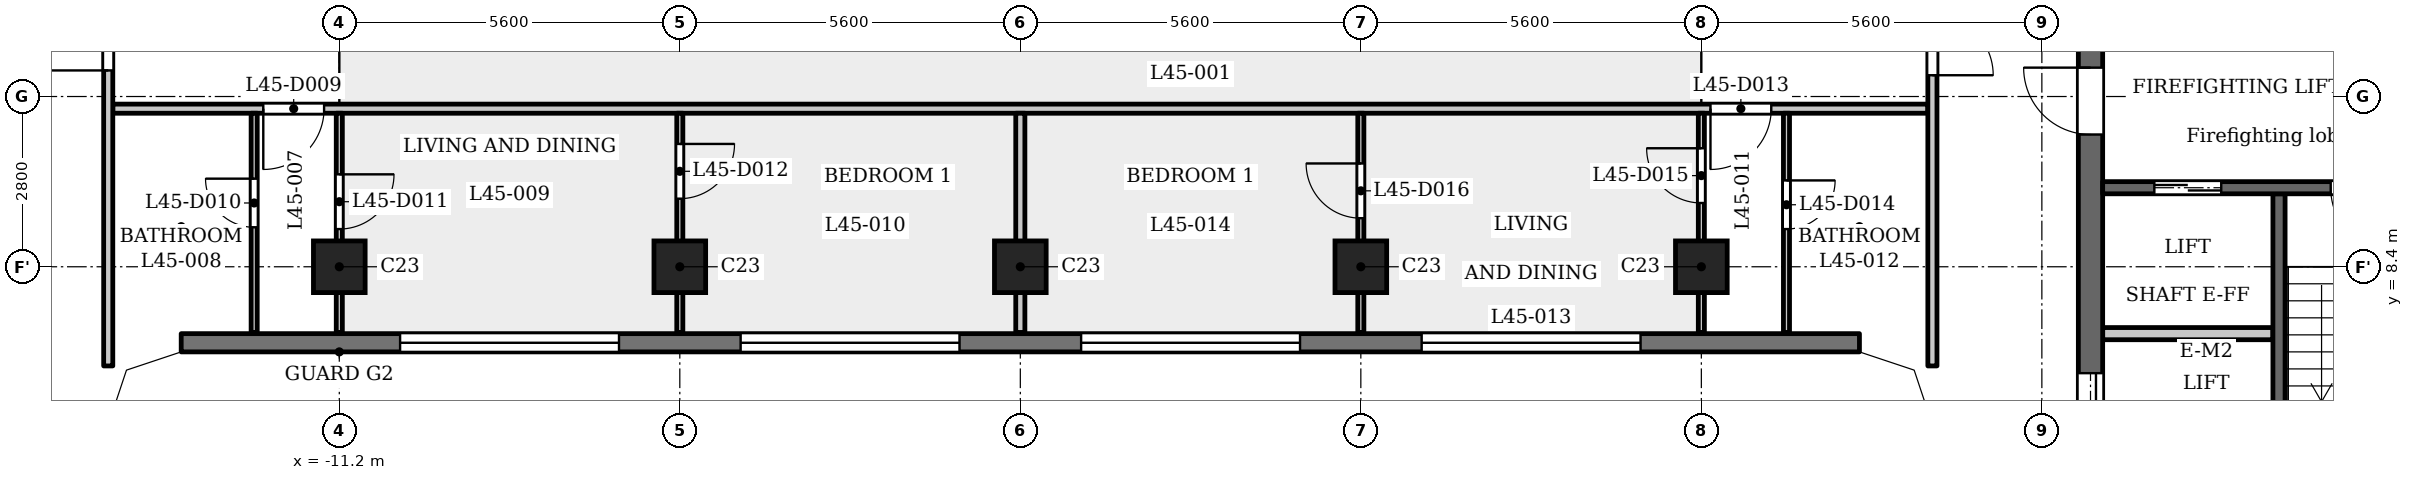
"""IFC4 building model, lengths in metres.
Left out: names, types, materials, properties, quantities, classifications, styles, units other than length and angle.
Written with IfcOpenShell. Run it as: python <this file> out.ifc"""

import sys

from ifc_helpers import new_model, si_unit, direction, frame, frame_2d, origin, origin_2d, place, context, subcontext, project, spatial, polyline, rectangle, outline, extrude, element, fill, save


model = new_model("IFC4")
c1 = context("Model", 3, precision=1e-05, world=origin(), true_north=direction((0.0, 1.0)))
c2 = subcontext(c1, "Body", "Model", "MODEL_VIEW")
j1 = project(units=[si_unit("LENGTHUNIT", "METRE"), si_unit("PLANEANGLEUNIT", "RADIAN")], contexts=[c1])
p1 = place(None, origin())
s1 = spatial("IfcSite", under=j1, at=p1, CompositionType="ELEMENT")
p2 = place(p1, origin())
s2 = spatial("IfcBuilding", under=s1, at=p2, CompositionType="ELEMENT")
p3 = place(p2, frame((0.0, 0.0, 174.6)))
s3 = spatial("IfcBuildingStorey", under=s2, at=p3, CompositionType="ELEMENT", Elevation=174.6)
for number, where, z_axis, x_axis in (
    (1, (-11.2, 8.4, 0.0), (0.0, 0.0, 1.0), (1.0, 0.0, 0.0)),
    (2, (-5.6, 8.4, 0.0), (0.0, 0.0, 1.0), (1.0, 0.0, 0.0)),
    (3, (0.0, 8.4, 0.0), (0.0, 0.0, 1.0), (1.0, 0.0, 0.0)),
    (4, (5.6, 8.4, 0.0), (0.0, 0.0, 1.0), (1.0, 0.0, 0.0)),
    (5, (11.2, 8.4, 0.0), (0.0, 0.0, 1.0), (1.0, 0.0, 0.0)),
):
    element("IfcColumn", number, at=place(p3, frame(where, z_axis=z_axis, x_axis=x_axis)), inside=s3, PredefinedType="COLUMN", context=c2, shape_type="SweptSolid", body=[
        extrude(rectangle(XDim=0.85, YDim=0.85, at=origin_2d()), origin(), (0.0, 0.0, 1.0), 3.5),
    ])
p4 = place(p3, frame((-13.8, 7.15, 0.0), z_axis=(0.0, 0.0, 1.0), x_axis=(1.0, 0.0, 0.0)))
e6 = element("IfcWall", 6, at=p4, inside=s3, PredefinedType="SOLIDWALL", context=c2, shape_type="SweptSolid", body=[
    extrude(rectangle(XDim=27.6, YDim=0.3, at=frame_2d((13.8, 0.0))), origin(), (0.0, 0.0, 1.0), 3.15),
])
p5 = place(p4, frame((3.6, 0.0, 1.2)))
e7 = element("IfcOpeningElement", 7, at=p5, cuts=e6, PredefinedType="OPENING", context=c2, shape_type="SweptSolid", body=[
    extrude(rectangle(XDim=3.6, YDim=0.95, at=frame_2d((1.8, 0.475))), frame((0.0, 0.16, 0.0), z_axis=(0.0, -1.0, 0.0), x_axis=(1.0, 0.0, 0.0)), (0.0, 0.0, 1.0), 0.32),
])
p6 = place(p4, frame((9.2, 0.0, 1.2)))
e8 = element("IfcOpeningElement", 8, at=p6, cuts=e6, PredefinedType="OPENING", context=c2, shape_type="SweptSolid", body=[
    extrude(rectangle(XDim=3.6, YDim=0.95, at=frame_2d((1.8, 0.475))), frame((0.0, 0.16, 0.0), z_axis=(0.0, -1.0, 0.0), x_axis=(1.0, 0.0, 0.0)), (0.0, 0.0, 1.0), 0.32),
])
p7 = place(p4, frame((14.8, 0.0, 1.2)))
e9 = element("IfcOpeningElement", 9, at=p7, cuts=e6, PredefinedType="OPENING", context=c2, shape_type="SweptSolid", body=[
    extrude(rectangle(XDim=3.6, YDim=0.95, at=frame_2d((1.8, 0.475))), frame((0.0, 0.16, 0.0), z_axis=(0.0, -1.0, 0.0), x_axis=(1.0, 0.0, 0.0)), (0.0, 0.0, 1.0), 0.32),
])
p8 = place(p4, frame((20.4, 0.0, 1.2)))
e10 = element("IfcOpeningElement", 10, at=p8, cuts=e6, PredefinedType="OPENING", context=c2, shape_type="SweptSolid", body=[
    extrude(rectangle(XDim=3.6, YDim=0.95, at=frame_2d((1.8, 0.475))), frame((0.0, 0.16, 0.0), z_axis=(0.0, -1.0, 0.0), x_axis=(1.0, 0.0, 0.0)), (0.0, 0.0, 1.0), 0.32),
])
p9 = place(p3, frame((20.7, 2.6, 0.0), z_axis=(0.0, 0.0, 1.0), x_axis=(0.0, 1.0, 0.0)))
e11 = element("IfcWall", 11, at=p9, inside=s3, PredefinedType="SHEAR", context=c2, shape_type="SweptSolid", body=[
    extrude(rectangle(XDim=7.0, YDim=0.2, at=frame_2d((3.5, 0.0))), origin(), (0.0, 0.0, 1.0), 3.15),
])
p10 = place(p3, frame((17.6, -12.45, 0.0), z_axis=(0.0, 0.0, 1.0), x_axis=(0.0, 1.0, 0.0)))
e12 = element("IfcWall", 12, at=p10, inside=s3, PredefinedType="SHEAR", context=c2, shape_type="SweptSolid", body=[
    extrude(rectangle(XDim=24.9, YDim=0.4, at=frame_2d((12.45, 0.0))), origin(), (0.0, 0.0, 1.0), 3.15),
])
p11 = place(p10, frame((8.65, 0.0, 0.0)))
e13 = element("IfcOpeningElement", 13, at=p11, cuts=e12, PredefinedType="OPENING", context=c2, shape_type="SweptSolid", body=[
    extrude(rectangle(XDim=0.9, YDim=2.1, at=frame_2d((0.45, 1.05))), frame((0.0, 0.21, 0.0), z_axis=(0.0, -1.0, 0.0), x_axis=(1.0, 0.0, 0.0)), (0.0, 0.0, 1.0), 0.42),
])
p12 = place(p10, frame((15.6, 0.0, 0.0)))
e14 = element("IfcOpeningElement", 14, at=p12, cuts=e12, PredefinedType="OPENING", context=c2, shape_type="SweptSolid", body=[
    extrude(rectangle(XDim=1.1, YDim=2.1, at=frame_2d((0.55, 1.05))), frame((0.0, 0.21, 0.0), z_axis=(0.0, -1.0, 0.0), x_axis=(1.0, 0.0, 0.0)), (0.0, 0.0, 1.0), 0.42),
])
p13 = place(p10, frame((18.0, 0.0, 0.0)))
e15 = element("IfcOpeningElement", 15, at=p13, cuts=e12, PredefinedType="OPENING", context=c2, shape_type="SweptSolid", body=[
    extrude(rectangle(XDim=1.1, YDim=2.1, at=frame_2d((0.55, 1.05))), frame((0.0, 0.21, 0.0), z_axis=(0.0, -1.0, 0.0), x_axis=(1.0, 0.0, 0.0)), (0.0, 0.0, 1.0), 0.42),
])
p14 = place(p10, frame((23.025, 0.0, 0.0)))
e16 = element("IfcOpeningElement", 16, at=p14, cuts=e12, PredefinedType="OPENING", context=c2, shape_type="SweptSolid", body=[
    extrude(rectangle(XDim=1.1, YDim=2.1, at=frame_2d((0.55, 1.05))), frame((0.0, 0.21, 0.0), z_axis=(0.0, -1.0, 0.0), x_axis=(1.0, 0.0, 0.0)), (0.0, 0.0, 1.0), 0.42),
])
p15 = place(p10, frame((0.775, 0.0, 0.0)))
e17 = element("IfcOpeningElement", 17, at=p15, cuts=e12, PredefinedType="OPENING", context=c2, shape_type="SweptSolid", body=[
    extrude(rectangle(XDim=1.1, YDim=2.1, at=frame_2d((0.55, 1.05))), frame((0.0, 0.21, 0.0), z_axis=(0.0, -1.0, 0.0), x_axis=(1.0, 0.0, 0.0)), (0.0, 0.0, 1.0), 0.42),
])
p16 = place(p10, frame((12.925, 0.0, 0.0)))
e18 = element("IfcOpeningElement", 18, at=p16, cuts=e12, PredefinedType="OPENING", context=c2, shape_type="SweptSolid", body=[
    extrude(rectangle(XDim=1.8, YDim=2.1, at=frame_2d((0.9, 1.05))), frame((0.0, 0.21, 0.0), z_axis=(0.0, -1.0, 0.0), x_axis=(1.0, 0.0, 0.0)), (0.0, 0.0, 1.0), 0.42),
])
p17 = place(p3, frame((17.8, 7.3, 0.0), z_axis=(0.0, 0.0, 1.0), x_axis=(1.0, 0.0, 0.0)))
e19 = element("IfcWall", 19, at=p17, inside=s3, PredefinedType="PARTITIONING", context=c2, shape_type="SweptSolid", body=[
    extrude(rectangle(XDim=2.8, YDim=0.2, at=frame_2d((1.4, 0.0))), origin(), (0.0, 0.0, 1.0), 3.15),
])
p18 = place(p3, frame((17.8, 9.7, 0.0), z_axis=(0.0, 0.0, 1.0), x_axis=(1.0, 0.0, 0.0)))
e20 = element("IfcWall", 20, at=p18, inside=s3, PredefinedType="SHEAR", context=c2, shape_type="SweptSolid", body=[
    extrude(rectangle(XDim=8.45, YDim=0.2, at=frame_2d((4.225, 0.0))), origin(), (0.0, 0.0, 1.0), 3.15),
])
p19 = place(p18, frame((0.85, 0.0, 0.0)))
e21 = element("IfcOpeningElement", 21, at=p19, cuts=e20, PredefinedType="OPENING", context=c2, shape_type="SweptSolid", body=[
    extrude(rectangle(XDim=1.1, YDim=2.1, at=frame_2d((0.55, 1.05))), frame((0.0, 0.11, 0.0), z_axis=(0.0, -1.0, 0.0), x_axis=(1.0, 0.0, 0.0)), (0.0, 0.0, 1.0), 0.22),
])
p20 = place(p18, frame((3.75, 0.0, 0.0)))
e22 = element("IfcOpeningElement", 22, at=p20, cuts=e20, PredefinedType="OPENING", context=c2, shape_type="SweptSolid", body=[
    extrude(rectangle(XDim=1.1, YDim=2.1, at=frame_2d((0.55, 1.05))), frame((0.0, 0.11, 0.0), z_axis=(0.0, -1.0, 0.0), x_axis=(1.0, 0.0, 0.0)), (0.0, 0.0, 1.0), 0.22),
])
p21 = place(p3, frame((-14.925, 11.0, 0.0), z_axis=(0.0, 0.0, 1.0), x_axis=(1.0, 0.0, 0.0)))
e23 = element("IfcWall", 23, at=p21, inside=s3, PredefinedType="PARTITIONING", context=c2, shape_type="SweptSolid", body=[
    extrude(rectangle(XDim=29.85, YDim=0.15, at=frame_2d((14.925, 0.0))), origin(), (0.0, 0.0, 1.0), 3.15),
])
p22 = place(p21, frame((2.475, 0.0, 0.0)))
e24 = element("IfcOpeningElement", 24, at=p22, cuts=e23, PredefinedType="OPENING", context=c2, shape_type="SweptSolid", body=[
    extrude(rectangle(XDim=1.0, YDim=2.1, at=frame_2d((0.5, 1.05))), frame((0.0, 0.085, 0.0), z_axis=(0.0, -1.0, 0.0), x_axis=(1.0, 0.0, 0.0)), (0.0, 0.0, 1.0), 0.17),
])
p23 = place(p21, frame((26.275, 0.0, 0.0)))
e25 = element("IfcOpeningElement", 25, at=p23, cuts=e23, PredefinedType="OPENING", context=c2, shape_type="SweptSolid", body=[
    extrude(rectangle(XDim=1.0, YDim=2.1, at=frame_2d((0.5, 1.05))), frame((0.0, 0.085, 0.0), z_axis=(0.0, -1.0, 0.0), x_axis=(1.0, 0.0, 0.0)), (0.0, 0.0, 1.0), 0.17),
])
p24 = place(p3, frame((-15.0, 6.769, 0.0), z_axis=(0.0, 0.0, 1.0), x_axis=(0.0, 1.0, 0.0)))
e26 = element("IfcWall", 26, at=p24, inside=s3, PredefinedType="PARTITIONING", context=c2, shape_type="SweptSolid", body=[
    extrude(rectangle(XDim=6.356, YDim=0.15, at=frame_2d((3.178, 0.0))), origin(), (0.0, 0.0, 1.0), 3.15),
])
p25 = place(p24, frame((4.86, 0.0, 0.0)))
e27 = element("IfcOpeningElement", 27, at=p25, cuts=e26, PredefinedType="OPENING", context=c2, shape_type="SweptSolid", body=[
    extrude(rectangle(XDim=1.0, YDim=2.1, at=frame_2d((0.5, 1.05))), frame((0.0, 0.085, 0.0), z_axis=(0.0, -1.0, 0.0), x_axis=(1.0, 0.0, 0.0)), (0.0, 0.0, 1.0), 0.17),
])
p26 = place(p3, frame((-12.6, 7.32, 0.0), z_axis=(0.0, 0.0, 1.0), x_axis=(0.0, 1.0, 0.0)))
e28 = element("IfcWall", 28, at=p26, inside=s3, PredefinedType="PARTITIONING", context=c2, shape_type="SweptSolid", body=[
    extrude(rectangle(XDim=3.605, YDim=0.1, at=frame_2d((1.802, 0.0))), origin(), (0.0, 0.0, 1.0), 3.15),
])
p27 = place(p26, frame((1.729, 0.0, 0.0)))
e29 = element("IfcOpeningElement", 29, at=p27, cuts=e28, PredefinedType="OPENING", context=c2, shape_type="SweptSolid", body=[
    extrude(rectangle(XDim=0.8, YDim=2.1, at=frame_2d((0.4, 1.05))), frame((0.0, 0.06, 0.0), z_axis=(0.0, -1.0, 0.0), x_axis=(1.0, 0.0, 0.0)), (0.0, 0.0, 1.0), 0.12),
])
p28 = place(p3, frame((-11.2, 7.32, 0.0), z_axis=(0.0, 0.0, 1.0), x_axis=(0.0, 1.0, 0.0)))
e30 = element("IfcWall", 30, at=p28, inside=s3, PredefinedType="PARTITIONING", context=c2, shape_type="SweptSolid", body=[
    extrude(rectangle(XDim=3.605, YDim=0.1, at=frame_2d((1.802, 0.0))), origin(), (0.0, 0.0, 1.0), 3.15),
])
p29 = place(p28, frame((1.7, 0.0, 0.0)))
e31 = element("IfcOpeningElement", 31, at=p29, cuts=e30, PredefinedType="OPENING", context=c2, shape_type="SweptSolid", body=[
    extrude(rectangle(XDim=0.9, YDim=2.1, at=frame_2d((0.45, 1.05))), frame((0.0, 0.06, 0.0), z_axis=(0.0, -1.0, 0.0), x_axis=(1.0, 0.0, 0.0)), (0.0, 0.0, 1.0), 0.12),
])
p30 = place(p3, frame((-5.6, 7.32, 0.0), z_axis=(0.0, 0.0, 1.0), x_axis=(0.0, 1.0, 0.0)))
e32 = element("IfcWall", 32, at=p30, inside=s3, PredefinedType="PARTITIONING", context=c2, shape_type="SweptSolid", body=[
    extrude(rectangle(XDim=3.605, YDim=0.1, at=frame_2d((1.802, 0.0))), origin(), (0.0, 0.0, 1.0), 3.15),
])
p31 = place(p30, frame((2.2, 0.0, 0.0)))
e33 = element("IfcOpeningElement", 33, at=p31, cuts=e32, PredefinedType="OPENING", context=c2, shape_type="SweptSolid", body=[
    extrude(rectangle(XDim=0.9, YDim=2.1, at=frame_2d((0.45, 1.05))), frame((0.0, 0.06, 0.0), z_axis=(0.0, -1.0, 0.0), x_axis=(1.0, 0.0, 0.0)), (0.0, 0.0, 1.0), 0.12),
])
p32 = place(p3, frame((0.0, 7.32, 0.0), z_axis=(0.0, 0.0, 1.0), x_axis=(0.0, 1.0, 0.0)))
e34 = element("IfcWall", 34, at=p32, inside=s3, PredefinedType="PARTITIONING", context=c2, shape_type="SweptSolid", body=[
    extrude(rectangle(XDim=3.605, YDim=0.15, at=frame_2d((1.802, 0.0))), origin(), (0.0, 0.0, 1.0), 3.15),
])
p33 = place(p3, frame((5.6, 7.32, 0.0), z_axis=(0.0, 0.0, 1.0), x_axis=(0.0, 1.0, 0.0)))
e35 = element("IfcWall", 35, at=p33, inside=s3, PredefinedType="PARTITIONING", context=c2, shape_type="SweptSolid", body=[
    extrude(rectangle(XDim=3.605, YDim=0.1, at=frame_2d((1.802, 0.0))), origin(), (0.0, 0.0, 1.0), 3.15),
])
p34 = place(p33, frame((1.879, 0.0, 0.0)))
e36 = element("IfcOpeningElement", 36, at=p34, cuts=e35, PredefinedType="OPENING", context=c2, shape_type="SweptSolid", body=[
    extrude(rectangle(XDim=0.9, YDim=2.1, at=frame_2d((0.45, 1.05))), frame((0.0, 0.06, 0.0), z_axis=(0.0, -1.0, 0.0), x_axis=(1.0, 0.0, 0.0)), (0.0, 0.0, 1.0), 0.12),
])
p35 = place(p3, frame((11.2, 7.32, 0.0), z_axis=(0.0, 0.0, 1.0), x_axis=(0.0, 1.0, 0.0)))
e37 = element("IfcWall", 37, at=p35, inside=s3, PredefinedType="PARTITIONING", context=c2, shape_type="SweptSolid", body=[
    extrude(rectangle(XDim=3.605, YDim=0.1, at=frame_2d((1.802, 0.0))), origin(), (0.0, 0.0, 1.0), 3.15),
])
p36 = place(p35, frame((2.129, 0.0, 0.0)))
e38 = element("IfcOpeningElement", 38, at=p36, cuts=e37, PredefinedType="OPENING", context=c2, shape_type="SweptSolid", body=[
    extrude(rectangle(XDim=0.9, YDim=2.1, at=frame_2d((0.45, 1.05))), frame((0.0, 0.06, 0.0), z_axis=(0.0, -1.0, 0.0), x_axis=(1.0, 0.0, 0.0)), (0.0, 0.0, 1.0), 0.12),
])
p37 = place(p3, frame((12.6, 7.32, 0.0), z_axis=(0.0, 0.0, 1.0), x_axis=(0.0, 1.0, 0.0)))
e39 = element("IfcWall", 39, at=p37, inside=s3, PredefinedType="PARTITIONING", context=c2, shape_type="SweptSolid", body=[
    extrude(rectangle(XDim=3.605, YDim=0.1, at=frame_2d((1.802, 0.0))), origin(), (0.0, 0.0, 1.0), 3.15),
])
p38 = place(p37, frame((1.7, 0.0, 0.0)))
e40 = element("IfcOpeningElement", 40, at=p38, cuts=e39, PredefinedType="OPENING", context=c2, shape_type="SweptSolid", body=[
    extrude(rectangle(XDim=0.8, YDim=2.1, at=frame_2d((0.4, 1.05))), frame((0.0, 0.06, 0.0), z_axis=(0.0, -1.0, 0.0), x_axis=(1.0, 0.0, 0.0)), (0.0, 0.0, 1.0), 0.12),
])
p39 = place(p3, frame((15.0, 6.769, 0.0), z_axis=(0.0, 0.0, 1.0), x_axis=(0.0, 1.0, 0.0)))
e41 = element("IfcWall", 41, at=p39, inside=s3, PredefinedType="PARTITIONING", context=c2, shape_type="SweptSolid", body=[
    extrude(rectangle(XDim=6.356, YDim=0.15, at=frame_2d((3.178, 0.0))), origin(), (0.0, 0.0, 1.0), 3.15),
])
p40 = place(p39, frame((4.781, 0.0, 0.0)))
e42 = element("IfcOpeningElement", 42, at=p40, cuts=e41, PredefinedType="OPENING", context=c2, shape_type="SweptSolid", body=[
    extrude(rectangle(XDim=1.0, YDim=2.1, at=frame_2d((0.5, 1.05))), frame((0.0, 0.085, 0.0), z_axis=(0.0, -1.0, 0.0), x_axis=(1.0, 0.0, 0.0)), (0.0, 0.0, 1.0), 0.17),
])
p41 = place(p3, origin())
e43 = element("IfcWall", 43, at=p41, inside=s3, PredefinedType="SOLIDWALL", context=c2, shape_type="SweptSolid", body=[
    extrude(outline(polyline([(-13.849, 7.3), (-14.937, 6.937), (-15.3, 5.849), (-15.3, 5.8), (-15.0, 5.8), (-14.7, 6.7), (-13.8, 7.0), (-13.8, 7.3), (-13.849, 7.3)])), origin(), (0.0, 0.0, 1.0), 3.15),
])
e44 = element("IfcWall", 44, at=p41, inside=s3, PredefinedType="SOLIDWALL", context=c2, shape_type="SweptSolid", body=[
    extrude(outline(polyline([(14.937, 6.937), (13.849, 7.3), (13.8, 7.3), (13.8, 7.0), (14.7, 6.7), (15.0, 5.8), (15.3, 5.8), (15.3, 5.849), (14.937, 6.937)])), origin(), (0.0, 0.0, 1.0), 3.15),
])
p42 = place(p13, origin())
e45 = element("IfcDoor", 45, at=p42, inside=s3, OperationType="DOUBLE_DOOR_SLIDING", PredefinedType="DOOR", context=c2, shape_type="SweptSolid", body=[
    extrude(rectangle(XDim=1.1, YDim=2.1, at=frame_2d((0.55, 1.05))), frame((0.0, 0.025, 0.0), z_axis=(0.0, -1.0, 0.0), x_axis=(1.0, 0.0, 0.0)), (0.0, 0.0, 1.0), 0.05),
])
fill(e15, e45)
p43 = place(p19, origin())
e46 = element("IfcDoor", 46, at=p43, inside=s3, OperationType="DOUBLE_DOOR_SLIDING", PredefinedType="DOOR", context=c2, shape_type="SweptSolid", body=[
    extrude(rectangle(XDim=1.1, YDim=2.1, at=frame_2d((0.55, 1.05))), frame((0.0, 0.025, 0.0), z_axis=(0.0, -1.0, 0.0), x_axis=(1.0, 0.0, 0.0)), (0.0, 0.0, 1.0), 0.05),
])
fill(e21, e46)
p44 = place(p14, origin())
e47 = element("IfcDoor", 47, at=p44, inside=s3, OperationType="SINGLE_SWING_LEFT", PredefinedType="DOOR", context=c2, shape_type="SweptSolid", body=[
    extrude(rectangle(XDim=1.1, YDim=2.1, at=frame_2d((0.55, 1.05))), frame((0.0, 0.025, 0.0), z_axis=(0.0, -1.0, 0.0), x_axis=(1.0, 0.0, 0.0)), (0.0, 0.0, 1.0), 0.05),
])
fill(e16, e47)
p45 = place(p20, origin())
e48 = element("IfcDoor", 48, at=p45, inside=s3, OperationType="SINGLE_SWING_RIGHT", PredefinedType="DOOR", context=c2, shape_type="SweptSolid", body=[
    extrude(rectangle(XDim=1.1, YDim=2.1, at=frame_2d((0.55, 1.05))), frame((0.0, 0.025, 0.0), z_axis=(0.0, -1.0, 0.0), x_axis=(1.0, 0.0, 0.0)), (0.0, 0.0, 1.0), 0.05),
])
fill(e22, e48)
p46 = place(p25, origin())
e49 = element("IfcDoor", 49, at=p46, inside=s3, OperationType="SINGLE_SWING_RIGHT", PredefinedType="DOOR", context=c2, shape_type="SweptSolid", body=[
    extrude(rectangle(XDim=1.0, YDim=2.1, at=frame_2d((0.5, 1.05))), frame((0.0, 0.025, 0.0), z_axis=(0.0, -1.0, 0.0), x_axis=(1.0, 0.0, 0.0)), (0.0, 0.0, 1.0), 0.05),
])
fill(e27, e49)
p47 = place(p40, origin())
e50 = element("IfcDoor", 50, at=p47, inside=s3, OperationType="SINGLE_SWING_LEFT", PredefinedType="DOOR", context=c2, shape_type="SweptSolid", body=[
    extrude(rectangle(XDim=1.0, YDim=2.1, at=frame_2d((0.5, 1.05))), frame((0.0, 0.025, 0.0), z_axis=(0.0, -1.0, 0.0), x_axis=(1.0, 0.0, 0.0)), (0.0, 0.0, 1.0), 0.05),
])
fill(e42, e50)
p48 = place(p22, origin())
e51 = element("IfcDoor", 51, at=p48, inside=s3, OperationType="SINGLE_SWING_LEFT", PredefinedType="DOOR", context=c2, shape_type="SweptSolid", body=[
    extrude(rectangle(XDim=1.0, YDim=2.1, at=frame_2d((0.5, 1.05))), frame((0.0, 0.025, 0.0), z_axis=(0.0, -1.0, 0.0), x_axis=(1.0, 0.0, 0.0)), (0.0, 0.0, 1.0), 0.05),
])
fill(e24, e51)
p49 = place(p27, origin())
e52 = element("IfcDoor", 52, at=p49, inside=s3, OperationType="SINGLE_SWING_LEFT", PredefinedType="DOOR", context=c2, shape_type="SweptSolid", body=[
    extrude(rectangle(XDim=0.8, YDim=2.1, at=frame_2d((0.4, 1.05))), frame((0.0, 0.025, 0.0), z_axis=(0.0, -1.0, 0.0), x_axis=(1.0, 0.0, 0.0)), (0.0, 0.0, 1.0), 0.05),
])
fill(e29, e52)
p50 = place(p29, origin())
e53 = element("IfcDoor", 53, at=p50, inside=s3, OperationType="SINGLE_SWING_RIGHT", PredefinedType="DOOR", context=c2, shape_type="SweptSolid", body=[
    extrude(rectangle(XDim=0.9, YDim=2.1, at=frame_2d((0.45, 1.05))), frame((0.0, 0.025, 0.0), z_axis=(0.0, -1.0, 0.0), x_axis=(1.0, 0.0, 0.0)), (0.0, 0.0, 1.0), 0.05),
])
fill(e31, e53)
p51 = place(p31, origin())
e54 = element("IfcDoor", 54, at=p51, inside=s3, OperationType="SINGLE_SWING_RIGHT", PredefinedType="DOOR", context=c2, shape_type="SweptSolid", body=[
    extrude(rectangle(XDim=0.9, YDim=2.1, at=frame_2d((0.45, 1.05))), frame((0.0, 0.025, 0.0), z_axis=(0.0, -1.0, 0.0), x_axis=(1.0, 0.0, 0.0)), (0.0, 0.0, 1.0), 0.05),
])
fill(e33, e54)
p52 = place(p23, origin())
e55 = element("IfcDoor", 55, at=p52, inside=s3, OperationType="SINGLE_SWING_LEFT", PredefinedType="DOOR", context=c2, shape_type="SweptSolid", body=[
    extrude(rectangle(XDim=1.0, YDim=2.1, at=frame_2d((0.5, 1.05))), frame((0.0, 0.025, 0.0), z_axis=(0.0, -1.0, 0.0), x_axis=(1.0, 0.0, 0.0)), (0.0, 0.0, 1.0), 0.05),
])
fill(e25, e55)
p53 = place(p38, origin())
e56 = element("IfcDoor", 56, at=p53, inside=s3, OperationType="SINGLE_SWING_RIGHT", PredefinedType="DOOR", context=c2, shape_type="SweptSolid", body=[
    extrude(rectangle(XDim=0.8, YDim=2.1, at=frame_2d((0.4, 1.05))), frame((0.0, 0.025, 0.0), z_axis=(0.0, -1.0, 0.0), x_axis=(1.0, 0.0, 0.0)), (0.0, 0.0, 1.0), 0.05),
])
fill(e40, e56)
p54 = place(p36, origin())
e57 = element("IfcDoor", 57, at=p54, inside=s3, OperationType="SINGLE_SWING_LEFT", PredefinedType="DOOR", context=c2, shape_type="SweptSolid", body=[
    extrude(rectangle(XDim=0.9, YDim=2.1, at=frame_2d((0.45, 1.05))), frame((0.0, 0.025, 0.0), z_axis=(0.0, -1.0, 0.0), x_axis=(1.0, 0.0, 0.0)), (0.0, 0.0, 1.0), 0.05),
])
fill(e38, e57)
p55 = place(p34, origin())
e58 = element("IfcDoor", 58, at=p55, inside=s3, OperationType="SINGLE_SWING_LEFT", PredefinedType="DOOR", context=c2, shape_type="SweptSolid", body=[
    extrude(rectangle(XDim=0.9, YDim=2.1, at=frame_2d((0.45, 1.05))), frame((0.0, 0.025, 0.0), z_axis=(0.0, -1.0, 0.0), x_axis=(1.0, 0.0, 0.0)), (0.0, 0.0, 1.0), 0.05),
])
fill(e36, e58)
p56 = place(p5, origin())
e59 = element("IfcWindow", 59, at=p56, inside=s3, PartitioningType="SINGLE_PANEL", PredefinedType="WINDOW", context=c2, shape_type="SweptSolid", body=[
    extrude(rectangle(XDim=3.6, YDim=0.95, at=frame_2d((1.8, 0.475))), frame((0.0, 0.03, 0.0), z_axis=(0.0, -1.0, 0.0), x_axis=(1.0, 0.0, 0.0)), (0.0, 0.0, 1.0), 0.06),
])
fill(e7, e59)
p57 = place(p6, origin())
e60 = element("IfcWindow", 60, at=p57, inside=s3, PartitioningType="SINGLE_PANEL", PredefinedType="WINDOW", context=c2, shape_type="SweptSolid", body=[
    extrude(rectangle(XDim=3.6, YDim=0.95, at=frame_2d((1.8, 0.475))), frame((0.0, 0.03, 0.0), z_axis=(0.0, -1.0, 0.0), x_axis=(1.0, 0.0, 0.0)), (0.0, 0.0, 1.0), 0.06),
])
fill(e8, e60)
p58 = place(p7, origin())
e61 = element("IfcWindow", 61, at=p58, inside=s3, PartitioningType="SINGLE_PANEL", PredefinedType="WINDOW", context=c2, shape_type="SweptSolid", body=[
    extrude(rectangle(XDim=3.6, YDim=0.95, at=frame_2d((1.8, 0.475))), frame((0.0, 0.03, 0.0), z_axis=(0.0, -1.0, 0.0), x_axis=(1.0, 0.0, 0.0)), (0.0, 0.0, 1.0), 0.06),
])
fill(e9, e61)
p59 = place(p8, origin())
e62 = element("IfcWindow", 62, at=p59, inside=s3, PartitioningType="SINGLE_PANEL", PredefinedType="WINDOW", context=c2, shape_type="SweptSolid", body=[
    extrude(rectangle(XDim=3.6, YDim=0.95, at=frame_2d((1.8, 0.475))), frame((0.0, 0.03, 0.0), z_axis=(0.0, -1.0, 0.0), x_axis=(1.0, 0.0, 0.0)), (0.0, 0.0, 1.0), 0.06),
])
fill(e10, e62)
save(model, sys.argv[1])
